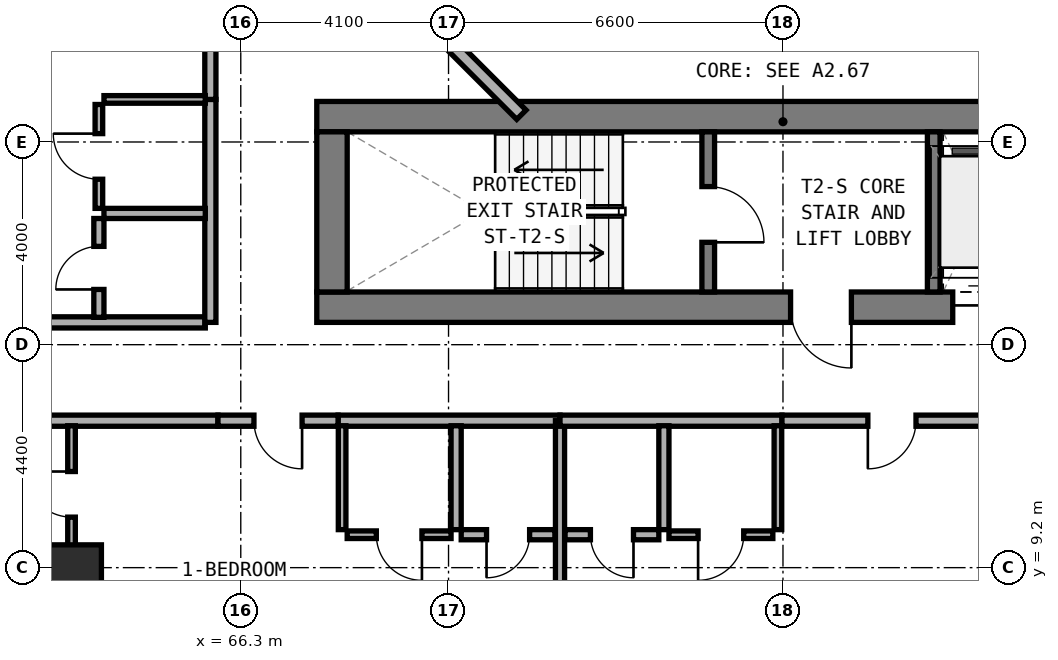
"""IFC4 building model, lengths in metres.
Left out: names, types, materials, properties, quantities, classifications, styles, units other than length and angle.
Written with IfcOpenShell. Run it as: python <this file> out.ifc"""

import sys

from ifc_helpers import new_model, si_unit, direction, frame, frame_2d, origin, origin_2d, place, context, subcontext, project, spatial, rectangle, extrude, element, fill, save


model = new_model("IFC4")
c1 = context("Model", 3, precision=1e-05, world=origin(), true_north=direction((0.0, 1.0)))
c2 = subcontext(c1, "Body", "Model", "MODEL_VIEW")
j1 = project(units=[si_unit("LENGTHUNIT", "METRE"), si_unit("PLANEANGLEUNIT", "RADIAN")], contexts=[c1])
p1 = place(None, origin())
s1 = spatial("IfcSite", under=j1, at=p1, CompositionType="ELEMENT")
p2 = place(p1, origin())
s2 = spatial("IfcBuilding", under=s1, at=p2, CompositionType="ELEMENT")
p3 = place(p2, frame((0.0, 0.0, 52.0)))
s3 = spatial("IfcBuildingStorey", under=s2, at=p3, CompositionType="ELEMENT", Elevation=52.0)
p4 = place(p3, frame((67.8, 14.34, 0.0), z_axis=(0.0, 0.0, 1.0), x_axis=(1.0, 0.0, 0.0)))
e1 = element("IfcWall", 1, at=p4, inside=s3, PredefinedType="SHEAR", context=c2, shape_type="SweptSolid", body=[
    extrude(rectangle(XDim=18.6, YDim=0.6, at=frame_2d((9.3, 0.0))), origin(), (0.0, 0.0, 1.0), 3.5),
])
p5 = place(p4, frame((9.35, 0.0, 0.0)))
e2 = element("IfcOpeningElement", 2, at=p5, cuts=e1, PredefinedType="OPENING", context=c2, shape_type="SweptSolid", body=[
    extrude(rectangle(XDim=1.2, YDim=2.15, at=frame_2d((0.6, 1.075))), frame((0.0, 0.31, 0.0), z_axis=(0.0, -1.0, 0.0), x_axis=(1.0, 0.0, 0.0)), (0.0, 0.0, 1.0), 0.62),
])
p6 = place(p4, frame((16.95, 0.0, 0.0)))
e3 = element("IfcOpeningElement", 3, at=p6, cuts=e1, PredefinedType="OPENING", context=c2, shape_type="SweptSolid", body=[
    extrude(rectangle(XDim=0.85, YDim=2.1, at=frame_2d((0.425, 1.05))), frame((0.0, 0.31, 0.0), z_axis=(0.0, -1.0, 0.0), x_axis=(1.0, 0.0, 0.0)), (0.0, 0.0, 1.0), 0.62),
])
p7 = place(p4, frame((12.55, 0.0, 0.0)))
e4 = element("IfcOpeningElement", 4, at=p7, cuts=e1, PredefinedType="OPENING", context=c2, shape_type="SweptSolid", body=[
    extrude(rectangle(XDim=1.1, YDim=2.15, at=frame_2d((0.55, 1.075))), frame((0.0, 0.31, 0.0), z_axis=(0.0, -1.0, 0.0), x_axis=(1.0, 0.0, 0.0)), (0.0, 0.0, 1.0), 0.62),
])
p8 = place(p4, frame((14.15, 0.0, 0.0)))
e5 = element("IfcOpeningElement", 5, at=p8, cuts=e1, PredefinedType="OPENING", context=c2, shape_type="SweptSolid", body=[
    extrude(rectangle(XDim=1.1, YDim=2.15, at=frame_2d((0.55, 1.075))), frame((0.0, 0.31, 0.0), z_axis=(0.0, -1.0, 0.0), x_axis=(1.0, 0.0, 0.0)), (0.0, 0.0, 1.0), 0.62),
])
p9 = place(p3, frame((67.8, 18.1, 0.0), z_axis=(0.0, 0.0, 1.0), x_axis=(1.0, 0.0, 0.0)))
e6 = element("IfcWall", 6, at=p9, inside=s3, PredefinedType="SHEAR", context=c2, shape_type="SweptSolid", body=[
    extrude(rectangle(XDim=18.6, YDim=0.6, at=frame_2d((9.3, 0.0))), origin(), (0.0, 0.0, 1.0), 3.5),
])
p10 = place(p3, frame((68.1, 14.64, 0.0), z_axis=(0.0, 0.0, 1.0), x_axis=(0.0, 1.0, 0.0)))
e7 = element("IfcWall", 7, at=p10, inside=s3, PredefinedType="SHEAR", context=c2, shape_type="SweptSolid", body=[
    extrude(rectangle(XDim=3.16, YDim=0.6, at=frame_2d((1.58, 0.0))), origin(), (0.0, 0.0, 1.0), 3.5),
])
p11 = place(p3, frame((75.525, 14.64, 0.0), z_axis=(0.0, 0.0, 1.0), x_axis=(0.0, 1.0, 0.0)))
e8 = element("IfcWall", 8, at=p11, inside=s3, PredefinedType="STANDARD", context=c2, shape_type="SweptSolid", body=[
    extrude(rectangle(XDim=3.16, YDim=0.25, at=frame_2d((1.58, 0.0))), origin(), (0.0, 0.0, 1.0), 3.25),
])
p12 = place(p11, frame((0.98, 0.0, 0.0)))
e9 = element("IfcOpeningElement", 9, at=p12, cuts=e8, PredefinedType="OPENING", context=c2, shape_type="SweptSolid", body=[
    extrude(rectangle(XDim=1.1, YDim=2.15, at=frame_2d((0.55, 1.075))), frame((0.0, 0.135, 0.0), z_axis=(0.0, -1.0, 0.0), x_axis=(1.0, 0.0, 0.0)), (0.0, 0.0, 1.0), 0.27),
])
p13 = place(p3, frame((79.975, 14.64, 0.0), z_axis=(0.0, 0.0, 1.0), x_axis=(0.0, 1.0, 0.0)))
e10 = element("IfcWall", 10, at=p13, inside=s3, PredefinedType="STANDARD", context=c2, shape_type="SweptSolid", body=[
    extrude(rectangle(XDim=3.16, YDim=0.25, at=frame_2d((1.58, 0.0))), origin(), (0.0, 0.0, 1.0), 3.25),
])
p14 = place(p3, frame((63.0, 9.0, 0.0), z_axis=(0.0, 0.0, 1.0), x_axis=(1.0, 0.0, 0.0)))
e11 = element("IfcColumn", 11, at=p14, inside=s3, PredefinedType="COLUMN", context=c2, shape_type="SweptSolid", body=[
    extrude(rectangle(XDim=1.1, YDim=1.3, at=origin_2d()), origin(), (0.0, 0.0, 1.0), 3.5),
])
p15 = place(p3, frame((70.204, 19.772, 0.0), z_axis=(0.0, 0.0, 1.0), x_axis=(0.707053950914, -0.707159607512, 0.0)))
e12 = element("IfcWall", 12, at=p15, inside=s3, PredefinedType="STANDARD", context=c2, shape_type="SweptSolid", body=[
    extrude(rectangle(XDim=2.311, YDim=0.26, at=frame_2d((1.155, 0.0))), origin(), (0.0, 0.0, 1.0), 3.25),
])
p16 = place(p3, frame((58.16, 12.1, 0.0), z_axis=(0.0, 0.0, 1.0), x_axis=(1.0, 0.0, 0.0)))
e13 = element("IfcWall", 13, at=p16, inside=s3, PredefinedType="SOLIDWALL", context=c2, shape_type="SweptSolid", body=[
    extrude(rectangle(XDim=7.69, YDim=0.22, at=frame_2d((3.845, 0.0))), origin(), (0.0, 0.0, 1.0), 2.865),
])
p17 = place(p3, frame((68.22, 12.1, 0.0), z_axis=(0.0, 0.0, 1.0), x_axis=(1.0, 0.0, 0.0)))
e14 = element("IfcWall", 14, at=p17, inside=s3, PredefinedType="SOLIDWALL", context=c2, shape_type="SweptSolid", body=[
    extrude(rectangle(XDim=4.38, YDim=0.22, at=frame_2d((2.19, 0.0))), origin(), (0.0, 0.0, 1.0), 2.725),
])
p18 = place(p3, frame((65.85, 12.1, 0.0), z_axis=(0.0, 0.0, 1.0), x_axis=(1.0, 0.0, 0.0)))
e15 = element("IfcWall", 15, at=p18, inside=s3, PredefinedType="SOLIDWALL", context=c2, shape_type="SweptSolid", body=[
    extrude(rectangle(XDim=2.37, YDim=0.22, at=frame_2d((1.185, 0.0))), origin(), (0.0, 0.0, 1.0), 3.22),
])
p19 = place(p18, frame((0.71, 0.0, 0.0)))
e16 = element("IfcOpeningElement", 16, at=p19, cuts=e15, PredefinedType="OPENING", context=c2, shape_type="SweptSolid", body=[
    extrude(rectangle(XDim=0.95, YDim=2.1, at=frame_2d((0.475, 1.05))), frame((0.0, 0.12, 0.0), z_axis=(0.0, -1.0, 0.0), x_axis=(1.0, 0.0, 0.0)), (0.0, 0.0, 1.0), 0.24),
])
p20 = place(p3, frame((62.96, 6.887, 0.0), z_axis=(0.0, 0.0, 1.0), x_axis=(0.0, 1.0, 0.0)))
e17 = element("IfcWall", 17, at=p20, inside=s3, PredefinedType="PARTITIONING", context=c2, shape_type="SweptSolid", body=[
    extrude(rectangle(XDim=5.113, YDim=0.15, at=frame_2d((2.557, 0.0))), origin(), (0.0, 0.0, 1.0), 2.865),
])
p21 = place(p20, frame((3.31, 0.0, 0.0)))
e18 = element("IfcOpeningElement", 18, at=p21, cuts=e17, PredefinedType="OPENING", context=c2, shape_type="SweptSolid", body=[
    extrude(rectangle(XDim=0.9, YDim=2.1, at=frame_2d((0.45, 1.05))), frame((0.0, 0.085, 0.0), z_axis=(0.0, -1.0, 0.0), x_axis=(1.0, 0.0, 0.0)), (0.0, 0.0, 1.0), 0.17),
])
p22 = place(p3, frame((70.55, 9.95, 0.0), z_axis=(0.0, 0.0, 1.0), x_axis=(0.0, 1.0, 0.0)))
e19 = element("IfcWall", 19, at=p22, inside=s3, PredefinedType="PLUMBINGWALL", context=c2, shape_type="SweptSolid", body=[
    extrude(rectangle(XDim=2.05, YDim=0.2, at=frame_2d((1.025, 0.0))), origin(), (0.0, 0.0, 1.0), 3.22),
])
p23 = place(p3, frame((68.3, 9.95, 0.0), z_axis=(0.0, 0.0, 1.0), x_axis=(0.0, 1.0, 0.0)))
e20 = element("IfcWall", 20, at=p23, inside=s3, PredefinedType="PARTITIONING", context=c2, shape_type="SweptSolid", body=[
    extrude(rectangle(XDim=2.05, YDim=0.15, at=frame_2d((1.025, 0.0))), origin(), (0.0, 0.0, 1.0), 3.22),
])
p24 = place(p3, frame((70.65, 9.85, 0.0), z_axis=(0.0, 0.0, 1.0), x_axis=(1.0, 0.0, 0.0)))
e21 = element("IfcWall", 21, at=p24, inside=s3, PredefinedType="PLUMBINGWALL", context=c2, shape_type="SweptSolid", body=[
    extrude(rectangle(XDim=1.85, YDim=0.2, at=frame_2d((0.925, 0.0))), origin(), (0.0, 0.0, 1.0), 3.22),
])
p25 = place(p24, frame((0.5, 0.0, 0.0)))
e22 = element("IfcOpeningElement", 22, at=p25, cuts=e21, PredefinedType="OPENING", context=c2, shape_type="SweptSolid", body=[
    extrude(rectangle(XDim=0.85, YDim=2.1, at=frame_2d((0.425, 1.05))), frame((0.0, 0.11, 0.0), z_axis=(0.0, -1.0, 0.0), x_axis=(1.0, 0.0, 0.0)), (0.0, 0.0, 1.0), 0.22),
])
p26 = place(p3, frame((68.4, 9.85, 0.0), z_axis=(0.0, 0.0, 1.0), x_axis=(1.0, 0.0, 0.0)))
e23 = element("IfcWall", 23, at=p26, inside=s3, PredefinedType="PARTITIONING", context=c2, shape_type="SweptSolid", body=[
    extrude(rectangle(XDim=2.05, YDim=0.15, at=frame_2d((1.025, 0.0))), origin(), (0.0, 0.0, 1.0), 3.22),
])
p27 = place(p26, frame((0.575, 0.0, 0.0)))
e24 = element("IfcOpeningElement", 24, at=p27, cuts=e23, PredefinedType="OPENING", context=c2, shape_type="SweptSolid", body=[
    extrude(rectangle(XDim=0.9, YDim=2.1, at=frame_2d((0.45, 1.05))), frame((0.0, 0.085, 0.0), z_axis=(0.0, -1.0, 0.0), x_axis=(1.0, 0.0, 0.0)), (0.0, 0.0, 1.0), 0.17),
])
p28 = place(p3, frame((72.6, 5.06, 0.0), z_axis=(0.0, 0.0, 1.0), x_axis=(0.0, 1.0, 0.0)))
e25 = element("IfcWall", 25, at=p28, inside=s3, PredefinedType="SOLIDWALL", context=c2, shape_type="SweptSolid", body=[
    extrude(rectangle(XDim=7.04, YDim=0.18, at=frame_2d((3.52, 0.0))), origin(), (0.0, 0.0, 1.0), 2.725),
])
p29 = place(p3, frame((72.6, 12.1, 0.0), z_axis=(0.0, 0.0, 1.0), x_axis=(1.0, 0.0, 0.0)))
e26 = element("IfcWall", 26, at=p29, inside=s3, PredefinedType="SOLIDWALL", context=c2, shape_type="SweptSolid", body=[
    extrude(rectangle(XDim=4.38, YDim=0.22, at=frame_2d((2.19, 0.0))), origin(), (0.0, 0.0, 1.0), 2.725),
])
p30 = place(p3, frame((76.98, 12.1, 0.0), z_axis=(0.0, 0.0, 1.0), x_axis=(1.0, 0.0, 0.0)))
e27 = element("IfcWall", 27, at=p30, inside=s3, PredefinedType="SOLIDWALL", context=c2, shape_type="SweptSolid", body=[
    extrude(rectangle(XDim=4.34, YDim=0.22, at=frame_2d((2.17, 0.0))), origin(), (0.0, 0.0, 1.0), 2.725),
])
p31 = place(p30, frame((1.695, 0.0, 0.0)))
e28 = element("IfcOpeningElement", 28, at=p31, cuts=e27, PredefinedType="OPENING", context=c2, shape_type="SweptSolid", body=[
    extrude(rectangle(XDim=0.95, YDim=2.1, at=frame_2d((0.475, 1.05))), frame((0.0, 0.12, 0.0), z_axis=(0.0, -1.0, 0.0), x_axis=(1.0, 0.0, 0.0)), (0.0, 0.0, 1.0), 0.24),
])
p32 = place(p3, frame((74.65, 9.95, 0.0), z_axis=(0.0, 0.0, 1.0), x_axis=(0.0, 1.0, 0.0)))
e29 = element("IfcWall", 29, at=p32, inside=s3, PredefinedType="PLUMBINGWALL", context=c2, shape_type="SweptSolid", body=[
    extrude(rectangle(XDim=2.05, YDim=0.2, at=frame_2d((1.025, 0.0))), origin(), (0.0, 0.0, 1.0), 2.775),
])
p33 = place(p3, frame((76.9, 9.95, 0.0), z_axis=(0.0, 0.0, 1.0), x_axis=(0.0, 1.0, 0.0)))
e30 = element("IfcWall", 30, at=p33, inside=s3, PredefinedType="PARTITIONING", context=c2, shape_type="SweptSolid", body=[
    extrude(rectangle(XDim=2.05, YDim=0.15, at=frame_2d((1.025, 0.0))), origin(), (0.0, 0.0, 1.0), 2.775),
])
p34 = place(p3, frame((72.7, 9.85, 0.0), z_axis=(0.0, 0.0, 1.0), x_axis=(1.0, 0.0, 0.0)))
e31 = element("IfcWall", 31, at=p34, inside=s3, PredefinedType="PLUMBINGWALL", context=c2, shape_type="SweptSolid", body=[
    extrude(rectangle(XDim=1.85, YDim=0.2, at=frame_2d((0.925, 0.0))), origin(), (0.0, 0.0, 1.0), 3.22),
])
p35 = place(p34, frame((0.5, 0.0, 0.0)))
e32 = element("IfcOpeningElement", 32, at=p35, cuts=e31, PredefinedType="OPENING", context=c2, shape_type="SweptSolid", body=[
    extrude(rectangle(XDim=0.85, YDim=2.1, at=frame_2d((0.425, 1.05))), frame((0.0, 0.11, 0.0), z_axis=(0.0, -1.0, 0.0), x_axis=(1.0, 0.0, 0.0)), (0.0, 0.0, 1.0), 0.22),
])
p36 = place(p3, frame((74.75, 9.85, 0.0), z_axis=(0.0, 0.0, 1.0), x_axis=(1.0, 0.0, 0.0)))
e33 = element("IfcWall", 33, at=p36, inside=s3, PredefinedType="PARTITIONING", context=c2, shape_type="SweptSolid", body=[
    extrude(rectangle(XDim=2.05, YDim=0.15, at=frame_2d((1.025, 0.0))), origin(), (0.0, 0.0, 1.0), 3.22),
])
p37 = place(p36, frame((0.575, 0.0, 0.0)))
e34 = element("IfcOpeningElement", 34, at=p37, cuts=e33, PredefinedType="OPENING", context=c2, shape_type="SweptSolid", body=[
    extrude(rectangle(XDim=0.9, YDim=2.1, at=frame_2d((0.45, 1.05))), frame((0.0, 0.085, 0.0), z_axis=(0.0, -1.0, 0.0), x_axis=(1.0, 0.0, 0.0)), (0.0, 0.0, 1.0), 0.17),
])
p38 = place(p3, frame((58.32, 14.04, 0.0), z_axis=(0.0, 0.0, 1.0), x_axis=(1.0, 0.0, 0.0)))
e35 = element("IfcWall", 35, at=p38, inside=s3, PredefinedType="SOLIDWALL", context=c2, shape_type="SweptSolid", body=[
    extrude(rectangle(XDim=7.28, YDim=0.22, at=frame_2d((3.64, 0.0))), origin(), (0.0, 0.0, 1.0), 2.865),
])
p39 = place(p3, frame((65.7, 14.04, 0.0), z_axis=(0.0, 0.0, 1.0), x_axis=(0.0, 1.0, 0.0)))
e36 = element("IfcWall", 36, at=p39, inside=s3, PredefinedType="SOLIDWALL", context=c2, shape_type="SweptSolid", body=[
    extrude(rectangle(XDim=4.4, YDim=0.22, at=frame_2d((2.2, 0.0))), origin(), (0.0, 0.0, 1.0), 3.22),
])
p40 = place(p3, frame((65.7, 18.44, 0.0), z_axis=(0.0, 0.0, 1.0), x_axis=(0.0, 1.0, 0.0)))
e37 = element("IfcWall", 37, at=p40, inside=s3, PredefinedType="SOLIDWALL", context=c2, shape_type="SweptSolid", body=[
    extrude(rectangle(XDim=9.56, YDim=0.22, at=frame_2d((4.78, 0.0))), origin(), (0.0, 0.0, 1.0), 2.725),
])
p41 = place(p40, frame((2.405, 0.0, 0.0)))
e38 = element("IfcOpeningElement", 38, at=p41, cuts=e37, PredefinedType="OPENING", context=c2, shape_type="SweptSolid", body=[
    extrude(rectangle(XDim=0.95, YDim=2.1, at=frame_2d((0.475, 1.05))), frame((0.0, 0.12, 0.0), z_axis=(0.0, -1.0, 0.0), x_axis=(1.0, 0.0, 0.0)), (0.0, 0.0, 1.0), 0.24),
])
p42 = place(p3, frame((63.6, 16.19, 0.0), z_axis=(0.0, 0.0, 1.0), x_axis=(1.0, 0.0, 0.0)))
e39 = element("IfcWall", 39, at=p42, inside=s3, PredefinedType="PLUMBINGWALL", context=c2, shape_type="SweptSolid", body=[
    extrude(rectangle(XDim=2.0, YDim=0.2, at=frame_2d((1.0, 0.0))), origin(), (0.0, 0.0, 1.0), 3.22),
])
p43 = place(p3, frame((63.6, 18.44, 0.0), z_axis=(0.0, 0.0, 1.0), x_axis=(1.0, 0.0, 0.0)))
e40 = element("IfcWall", 40, at=p43, inside=s3, PredefinedType="PARTITIONING", context=c2, shape_type="SweptSolid", body=[
    extrude(rectangle(XDim=2.0, YDim=0.15, at=frame_2d((1.0, 0.0))), origin(), (0.0, 0.0, 1.0), 3.22),
])
p44 = place(p3, frame((63.5, 14.14, 0.0), z_axis=(0.0, 0.0, 1.0), x_axis=(0.0, 1.0, 0.0)))
e41 = element("IfcWall", 41, at=p44, inside=s3, PredefinedType="PLUMBINGWALL", context=c2, shape_type="SweptSolid", body=[
    extrude(rectangle(XDim=1.95, YDim=0.2, at=frame_2d((0.975, 0.0))), origin(), (0.0, 0.0, 1.0), 3.22),
])
p45 = place(p44, frame((0.55, 0.0, 0.0)))
e42 = element("IfcOpeningElement", 42, at=p45, cuts=e41, PredefinedType="OPENING", context=c2, shape_type="SweptSolid", body=[
    extrude(rectangle(XDim=0.85, YDim=2.1, at=frame_2d((0.425, 1.05))), frame((0.0, 0.11, 0.0), z_axis=(0.0, -1.0, 0.0), x_axis=(1.0, 0.0, 0.0)), (0.0, 0.0, 1.0), 0.22),
])
p46 = place(p3, frame((63.5, 16.29, 0.0), z_axis=(0.0, 0.0, 1.0), x_axis=(0.0, 1.0, 0.0)))
e43 = element("IfcWall", 43, at=p46, inside=s3, PredefinedType="PARTITIONING", context=c2, shape_type="SweptSolid", body=[
    extrude(rectangle(XDim=2.05, YDim=0.15, at=frame_2d((1.025, 0.0))), origin(), (0.0, 0.0, 1.0), 3.22),
])
p47 = place(p46, frame((0.575, 0.0, 0.0)))
e44 = element("IfcOpeningElement", 44, at=p47, cuts=e43, PredefinedType="OPENING", context=c2, shape_type="SweptSolid", body=[
    extrude(rectangle(XDim=0.9, YDim=2.1, at=frame_2d((0.45, 1.05))), frame((0.0, 0.085, 0.0), z_axis=(0.0, -1.0, 0.0), x_axis=(1.0, 0.0, 0.0)), (0.0, 0.0, 1.0), 0.17),
])
p48 = place(p12, frame((1.1, 0.0, 0.0), z_axis=(0.0, 0.0, 1.0), x_axis=(-1.0, 0.0, 0.0)))
e45 = element("IfcDoor", 45, at=p48, inside=s3, OperationType="SINGLE_SWING_RIGHT", PredefinedType="DOOR", context=c2, shape_type="SweptSolid", body=[
    extrude(rectangle(XDim=1.1, YDim=2.15, at=frame_2d((0.55, 1.075))), frame((0.0, 0.025, 0.0), z_axis=(0.0, -1.0, 0.0), x_axis=(1.0, 0.0, 0.0)), (0.0, 0.0, 1.0), 0.05),
])
fill(e9, e45)
p49 = place(p5, frame((1.2, 0.0, 0.0), z_axis=(0.0, 0.0, 1.0), x_axis=(-1.0, 0.0, 0.0)))
e46 = element("IfcDoor", 46, at=p49, inside=s3, OperationType="SINGLE_SWING_LEFT", PredefinedType="DOOR", context=c2, shape_type="SweptSolid", body=[
    extrude(rectangle(XDim=1.2, YDim=2.15, at=frame_2d((0.6, 1.075))), frame((0.0, 0.025, 0.0), z_axis=(0.0, -1.0, 0.0), x_axis=(1.0, 0.0, 0.0)), (0.0, 0.0, 1.0), 0.05),
])
fill(e2, e46)
p50 = place(p7, frame((1.1, 0.0, 0.0), z_axis=(0.0, 0.0, 1.0), x_axis=(-1.0, 0.0, 0.0)))
e47 = element("IfcDoor", 47, at=p50, inside=s3, OperationType="DOUBLE_DOOR_SLIDING", PredefinedType="DOOR", context=c2, shape_type="SweptSolid", body=[
    extrude(rectangle(XDim=1.1, YDim=2.15, at=frame_2d((0.55, 1.075))), frame((0.0, 0.025, 0.0), z_axis=(0.0, -1.0, 0.0), x_axis=(1.0, 0.0, 0.0)), (0.0, 0.0, 1.0), 0.05),
])
fill(e4, e47)
p51 = place(p19, frame((0.95, 0.0, 0.0), z_axis=(0.0, 0.0, 1.0), x_axis=(-1.0, 0.0, 0.0)))
e48 = element("IfcDoor", 48, at=p51, inside=s3, OperationType="SINGLE_SWING_LEFT", PredefinedType="DOOR", context=c2, shape_type="SweptSolid", body=[
    extrude(rectangle(XDim=0.95, YDim=2.1, at=frame_2d((0.475, 1.05))), frame((0.0, 0.025, 0.0), z_axis=(0.0, -1.0, 0.0), x_axis=(1.0, 0.0, 0.0)), (0.0, 0.0, 1.0), 0.05),
])
fill(e16, e48)
p52 = place(p21, origin())
e49 = element("IfcDoor", 49, at=p52, inside=s3, OperationType="SINGLE_SWING_RIGHT", PredefinedType="DOOR", context=c2, shape_type="SweptSolid", body=[
    extrude(rectangle(XDim=0.9, YDim=2.1, at=frame_2d((0.45, 1.05))), frame((0.0, 0.025, 0.0), z_axis=(0.0, -1.0, 0.0), x_axis=(1.0, 0.0, 0.0)), (0.0, 0.0, 1.0), 0.05),
])
fill(e18, e49)
p53 = place(p25, frame((0.85, 0.0, 0.0), z_axis=(0.0, 0.0, 1.0), x_axis=(-1.0, 0.0, 0.0)))
e50 = element("IfcDoor", 50, at=p53, inside=s3, OperationType="SINGLE_SWING_RIGHT", PredefinedType="DOOR", context=c2, shape_type="SweptSolid", body=[
    extrude(rectangle(XDim=0.85, YDim=2.1, at=frame_2d((0.425, 1.05))), frame((0.0, 0.025, 0.0), z_axis=(0.0, -1.0, 0.0), x_axis=(1.0, 0.0, 0.0)), (0.0, 0.0, 1.0), 0.05),
])
fill(e22, e50)
p54 = place(p27, frame((0.9, 0.0, 0.0), z_axis=(0.0, 0.0, 1.0), x_axis=(-1.0, 0.0, 0.0)))
e51 = element("IfcDoor", 51, at=p54, inside=s3, OperationType="SINGLE_SWING_LEFT", PredefinedType="DOOR", context=c2, shape_type="SweptSolid", body=[
    extrude(rectangle(XDim=0.9, YDim=2.1, at=frame_2d((0.45, 1.05))), frame((0.0, 0.025, 0.0), z_axis=(0.0, -1.0, 0.0), x_axis=(1.0, 0.0, 0.0)), (0.0, 0.0, 1.0), 0.05),
])
fill(e24, e51)
p55 = place(p31, frame((0.95, 0.0, 0.0), z_axis=(0.0, 0.0, 1.0), x_axis=(-1.0, 0.0, 0.0)))
e52 = element("IfcDoor", 52, at=p55, inside=s3, OperationType="SINGLE_SWING_RIGHT", PredefinedType="DOOR", context=c2, shape_type="SweptSolid", body=[
    extrude(rectangle(XDim=0.95, YDim=2.1, at=frame_2d((0.475, 1.05))), frame((0.0, 0.025, 0.0), z_axis=(0.0, -1.0, 0.0), x_axis=(1.0, 0.0, 0.0)), (0.0, 0.0, 1.0), 0.05),
])
fill(e28, e52)
p56 = place(p35, frame((0.85, 0.0, 0.0), z_axis=(0.0, 0.0, 1.0), x_axis=(-1.0, 0.0, 0.0)))
e53 = element("IfcDoor", 53, at=p56, inside=s3, OperationType="SINGLE_SWING_LEFT", PredefinedType="DOOR", context=c2, shape_type="SweptSolid", body=[
    extrude(rectangle(XDim=0.85, YDim=2.1, at=frame_2d((0.425, 1.05))), frame((0.0, 0.025, 0.0), z_axis=(0.0, -1.0, 0.0), x_axis=(1.0, 0.0, 0.0)), (0.0, 0.0, 1.0), 0.05),
])
fill(e32, e53)
p57 = place(p37, frame((0.9, 0.0, 0.0), z_axis=(0.0, 0.0, 1.0), x_axis=(-1.0, 0.0, 0.0)))
e54 = element("IfcDoor", 54, at=p57, inside=s3, OperationType="SINGLE_SWING_RIGHT", PredefinedType="DOOR", context=c2, shape_type="SweptSolid", body=[
    extrude(rectangle(XDim=0.9, YDim=2.1, at=frame_2d((0.45, 1.05))), frame((0.0, 0.025, 0.0), z_axis=(0.0, -1.0, 0.0), x_axis=(1.0, 0.0, 0.0)), (0.0, 0.0, 1.0), 0.05),
])
fill(e34, e54)
p58 = place(p45, origin())
e55 = element("IfcDoor", 55, at=p58, inside=s3, OperationType="SINGLE_SWING_LEFT", PredefinedType="DOOR", context=c2, shape_type="SweptSolid", body=[
    extrude(rectangle(XDim=0.85, YDim=2.1, at=frame_2d((0.425, 1.05))), frame((0.0, 0.025, 0.0), z_axis=(0.0, -1.0, 0.0), x_axis=(1.0, 0.0, 0.0)), (0.0, 0.0, 1.0), 0.05),
])
fill(e42, e55)
p59 = place(p47, origin())
e56 = element("IfcDoor", 56, at=p59, inside=s3, OperationType="SINGLE_SWING_RIGHT", PredefinedType="DOOR", context=c2, shape_type="SweptSolid", body=[
    extrude(rectangle(XDim=0.9, YDim=2.1, at=frame_2d((0.45, 1.05))), frame((0.0, 0.025, 0.0), z_axis=(0.0, -1.0, 0.0), x_axis=(1.0, 0.0, 0.0)), (0.0, 0.0, 1.0), 0.05),
])
fill(e44, e56)
save(model, sys.argv[1])
